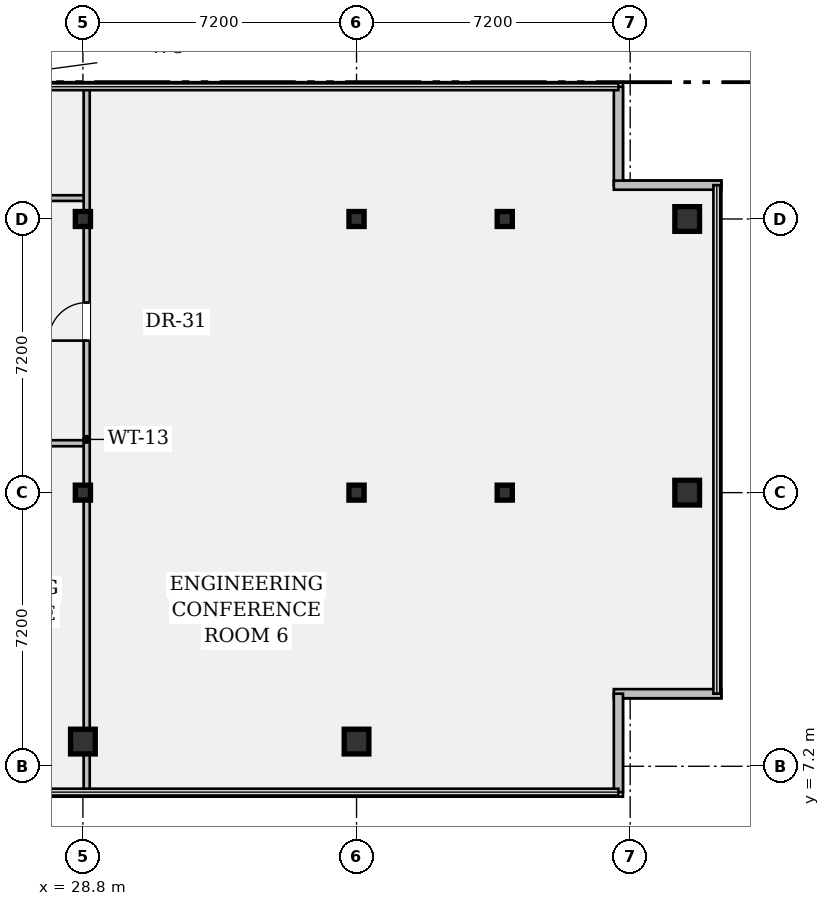
"""IFC4 building model, lengths in metres.
Left out: names, types, materials, properties, quantities, classifications, styles, units other than length and angle.
Written with IfcOpenShell. Run it as: python <this file> out.ifc"""

import sys

from ifc_helpers import new_model, si_unit, direction, frame, frame_2d, origin, origin_2d, place, context, subcontext, project, spatial, rectangle, hollow_rectangle, i_section, extrude, element, fill, save


model = new_model("IFC4")
c1 = context("Model", 3, precision=1e-05, world=origin(), true_north=direction((0.0, 1.0)))
c2 = subcontext(c1, "Body", "Model", "MODEL_VIEW")
j1 = project(units=[si_unit("LENGTHUNIT", "METRE"), si_unit("PLANEANGLEUNIT", "RADIAN")], contexts=[c1])
p1 = place(None, origin())
s1 = spatial("IfcSite", under=j1, at=p1, CompositionType="ELEMENT")
p2 = place(p1, origin())
s2 = spatial("IfcBuilding", under=s1, at=p2, CompositionType="ELEMENT")
p3 = place(p2, frame((0.0, 0.0, 269.15)))
s3 = spatial("IfcBuildingStorey", under=s2, at=p3, CompositionType="ELEMENT", Elevation=269.15)
p4 = place(p3, frame((28.8, 7.85, 0.0), z_axis=(0.0, 0.0, 1.0), x_axis=(1.0, 0.0, 0.0)))
e1 = element("IfcColumn", 1, at=p4, inside=s3, PredefinedType="COLUMN", context=c2, shape_type="SweptSolid", body=[
    extrude(hollow_rectangle(XDim=0.65, YDim=0.65, WallThickness=0.04, at=origin_2d()), origin(), (0.0, 0.0, 1.0), 3.24),
])
for number, where, z_axis, x_axis in (
    (2, (28.8, 14.4, 0.0), (0.0, 0.0, 1.0), (1.0, 0.0, 0.0)),
    (3, (28.8, 21.6, 0.0), (0.0, 0.0, 1.0), (1.0, 0.0, 0.0)),
):
    element("IfcColumn", number, at=place(p3, frame(where, z_axis=z_axis, x_axis=x_axis)), inside=s3, PredefinedType="COLUMN", context=c2, shape_type="SweptSolid", body=[
        extrude(i_section(OverallWidth=0.399, OverallDepth=0.394, WebThickness=0.023, FlangeThickness=0.037, FilletRadius=0.018, at=origin_2d()), origin(), (0.0, 0.0, 1.0), 3.24),
    ])
p5 = place(p3, frame((36.0, 7.85, 0.0), z_axis=(0.0, 0.0, 1.0), x_axis=(1.0, 0.0, 0.0)))
e4 = element("IfcColumn", 4, at=p5, inside=s3, PredefinedType="COLUMN", context=c2, shape_type="SweptSolid", body=[
    extrude(hollow_rectangle(XDim=0.65, YDim=0.65, WallThickness=0.04, at=origin_2d()), origin(), (0.0, 0.0, 1.0), 3.24),
])
for number, where, z_axis, x_axis in (
    (5, (36.0, 14.4, 0.0), (0.0, 0.0, 1.0), (1.0, 0.0, 0.0)),
    (6, (36.0, 21.6, 0.0), (0.0, 0.0, 1.0), (1.0, 0.0, 0.0)),
    (7, (39.9, 14.4, 0.0), (0.0, 0.0, 1.0), (1.0, 0.0, 0.0)),
    (8, (39.9, 21.6, 0.0), (0.0, 0.0, 1.0), (1.0, 0.0, 0.0)),
):
    element("IfcColumn", number, at=place(p3, frame(where, z_axis=z_axis, x_axis=x_axis)), inside=s3, PredefinedType="COLUMN", context=c2, shape_type="SweptSolid", body=[
        extrude(i_section(OverallWidth=0.399, OverallDepth=0.394, WebThickness=0.023, FlangeThickness=0.037, FilletRadius=0.018, at=origin_2d()), origin(), (0.0, 0.0, 1.0), 3.24),
    ])
for number, where, z_axis, x_axis in (
    (9, (44.7, 14.4, 0.0), (0.0, 0.0, 1.0), (1.0, 0.0, 0.0)),
    (10, (44.7, 21.6, 0.0), (0.0, 0.0, 1.0), (1.0, 0.0, 0.0)),
):
    element("IfcColumn", number, at=place(p3, frame(where, z_axis=z_axis, x_axis=x_axis)), inside=s3, PredefinedType="COLUMN", context=c2, shape_type="SweptSolid", body=[
        extrude(hollow_rectangle(XDim=0.65, YDim=0.65, WallThickness=0.04, at=origin_2d()), origin(), (0.0, 0.0, 1.0), 3.24),
    ])
p6 = place(p3, frame((42.89, 25.08, 0.0), z_axis=(0.0, 0.0, 1.0), x_axis=(0.0, -1.0, 0.0)))
e11 = element("IfcWall", 11, at=p6, inside=s3, PredefinedType="STANDARD", context=c2, shape_type="SweptSolid", body=[
    extrude(rectangle(XDim=2.59, YDim=0.24, at=frame_2d((1.295, 0.0))), origin(), (0.0, 0.0, 1.0), 3.24),
])
for number, where, z_axis, x_axis in (
    (12, (42.77, 22.49, 0.0), (0.0, 0.0, 1.0), (1.0, 0.0, 0.0)),
    (13, (45.6, 9.11, 0.0), (0.0, 0.0, 1.0), (-1.0, 0.0, 0.0)),
):
    element("IfcWall", number, at=place(p3, frame(where, z_axis=z_axis, x_axis=x_axis)), inside=s3, PredefinedType="STANDARD", context=c2, shape_type="SweptSolid", body=[
        extrude(rectangle(XDim=2.83, YDim=0.24, at=frame_2d((1.415, 0.0))), origin(), (0.0, 0.0, 1.0), 3.24),
    ])
p7 = place(p3, frame((42.89, 9.11, 0.0), z_axis=(0.0, 0.0, 1.0), x_axis=(0.0, -1.0, 0.0)))
e14 = element("IfcWall", 14, at=p7, inside=s3, PredefinedType="STANDARD", context=c2, shape_type="SweptSolid", body=[
    extrude(rectangle(XDim=2.59, YDim=0.24, at=frame_2d((1.295, 0.0))), origin(), (0.0, 0.0, 1.0), 3.24),
])
p8 = place(p3, frame((26.95, 15.7, 0.0), z_axis=(0.0, 0.0, 1.0), x_axis=(1.0, 0.0, 0.0)))
e15 = element("IfcWall", 15, at=p8, inside=s3, PredefinedType="PARTITIONING", context=c2, shape_type="SweptSolid", body=[
    extrude(rectangle(XDim=1.95, YDim=0.16, at=frame_2d((0.975, 0.0))), origin(), (0.0, 0.0, 1.0), 2.676),
])
p9 = place(p3, frame((26.95, 22.15, 0.0), z_axis=(0.0, 0.0, 1.0), x_axis=(1.0, 0.0, 0.0)))
e16 = element("IfcWall", 16, at=p9, inside=s3, PredefinedType="PARTITIONING", context=c2, shape_type="SweptSolid", body=[
    extrude(rectangle(XDim=1.95, YDim=0.15, at=frame_2d((0.975, 0.0))), origin(), (0.0, 0.0, 1.0), 3.24),
])
p10 = place(p3, frame((28.9, 6.52, 0.0), z_axis=(0.0, 0.0, 1.0), x_axis=(0.0, 1.0, 0.0)))
e17 = element("IfcWall", 17, at=p10, inside=s3, PredefinedType="PARTITIONING", context=c2, shape_type="SweptSolid", body=[
    extrude(rectangle(XDim=18.56, YDim=0.16, at=frame_2d((9.28, 0.0))), origin(), (0.0, 0.0, 1.0), 2.676),
])
p11 = place(p10, frame((11.88, 0.0, 0.0)))
e18 = element("IfcOpeningElement", 18, at=p11, cuts=e17, PredefinedType="OPENING", context=c2, shape_type="SweptSolid", body=[
    extrude(rectangle(XDim=1.0, YDim=2.15, at=frame_2d((0.5, 1.075))), frame((0.0, 0.092, 0.0), z_axis=(0.0, -1.0, 0.0), x_axis=(1.0, 0.0, 0.0)), (0.0, 0.0, 1.0), 0.184),
])
p12 = place(p11, origin())
e19 = element("IfcDoor", 19, at=p12, inside=s3, OperationType="SINGLE_SWING_LEFT", PredefinedType="DOOR", context=c2, shape_type="SweptSolid", body=[
    extrude(rectangle(XDim=1.0, YDim=2.15, at=frame_2d((0.5, 1.075))), frame((0.0, 0.025, 0.0), z_axis=(0.0, -1.0, 0.0), x_axis=(1.0, 0.0, 0.0)), (0.0, 0.0, 1.0), 0.05),
])
fill(e18, e19)
save(model, sys.argv[1])
